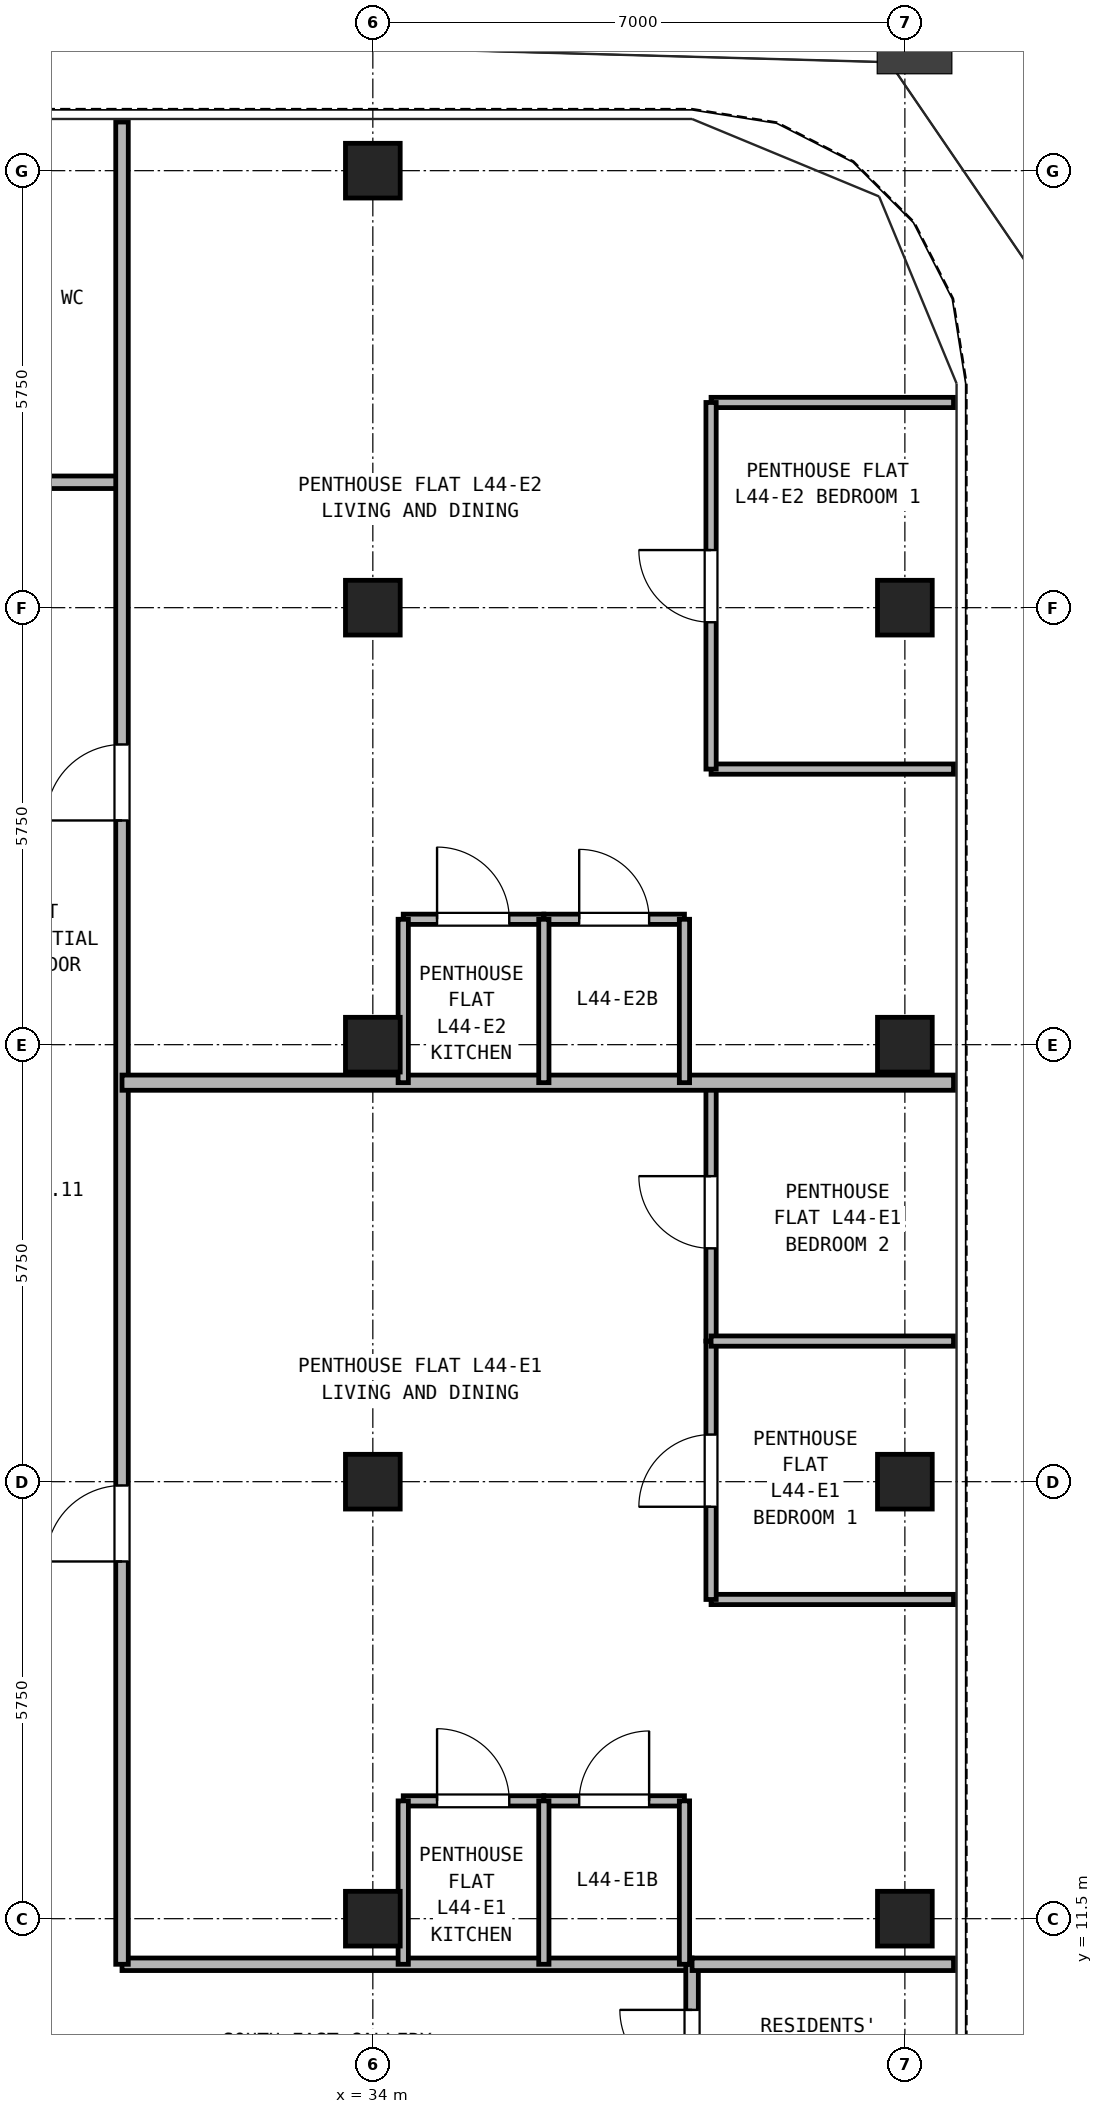
"""IFC4 building model, lengths in metres.
Left out: names, types, materials, properties, quantities, classifications, styles, units other than length and angle.
Written with IfcOpenShell. Run it as: python <this file> out.ifc"""

import sys

from ifc_helpers import new_model, si_unit, direction, frame, frame_2d, origin, origin_2d, place, context, subcontext, project, spatial, rectangle, hollow_rectangle, extrude, source, transform, mapped, element, fill, save


model = new_model("IFC4")
c1 = context("Model", 3, precision=1e-05, world=origin(), true_north=direction((0.0, 1.0)))
c2 = subcontext(c1, "Body", "Model", "MODEL_VIEW")
j1 = project(units=[si_unit("LENGTHUNIT", "METRE"), si_unit("PLANEANGLEUNIT", "RADIAN")], contexts=[c1])
p1 = place(None, origin())
s1 = spatial("IfcSite", under=j1, at=p1, CompositionType="ELEMENT")
p2 = place(p1, origin())
s2 = spatial("IfcBuilding", under=s1, at=p2, CompositionType="ELEMENT")
p3 = place(p2, frame((0.0, 0.0, 159.3)))
s3 = spatial("IfcBuildingStorey", under=s2, at=p3, CompositionType="ELEMENT", Elevation=159.3)
m1 = source(origin(), c2, "Body", "SweptSolid", [
    extrude(hollow_rectangle(XDim=0.72, YDim=0.72, WallThickness=0.04, at=origin_2d()), origin(), (0.0, 0.0, 1.0), 2.95),
])
for number, where, z_axis, x_axis in (
    (1, (34.0, 34.5, 0.0), (0.0, 0.0, 1.0), (1.0, 0.0, 0.0)),
    (2, (41.0, 11.5, 0.0), (0.0, 0.0, 1.0), (1.0, 0.0, 0.0)),
    (3, (41.0, 17.25, 0.0), (0.0, 0.0, 1.0), (1.0, 0.0, 0.0)),
    (4, (41.0, 23.0, 0.0), (0.0, 0.0, 1.0), (1.0, 0.0, 0.0)),
    (5, (41.0, 28.75, 0.0), (0.0, 0.0, 1.0), (1.0, 0.0, 0.0)),
    (6, (34.0, 11.5, 0.0), (0.0, 0.0, 1.0), (1.0, 0.0, 0.0)),
    (7, (34.0, 17.25, 0.0), (0.0, 0.0, 1.0), (1.0, 0.0, 0.0)),
    (8, (34.0, 23.0, 0.0), (0.0, 0.0, 1.0), (1.0, 0.0, 0.0)),
    (9, (34.0, 28.75, 0.0), (0.0, 0.0, 1.0), (1.0, 0.0, 0.0)),
):
    element("IfcColumn", number, at=place(p3, frame(where, z_axis=z_axis, x_axis=x_axis)), inside=s3, PredefinedType="COLUMN", context=c2, shape_type="MappedRepresentation", body=[
        mapped(m1, transform((0.0, 0.0, 0.0), x_axis=(1.0, 0.0, 0.0), y_axis=(0.0, 1.0, 0.0), z_axis=(0.0, 0.0, 1.0), scale=1.0)),
    ])
p4 = place(p3, frame((30.7, 10.9, 0.0), z_axis=(0.0, 0.0, 1.0), x_axis=(1.0, 0.0, 0.0)))
e10 = element("IfcWall", 10, at=p4, inside=s3, PredefinedType="PARTITIONING", context=c2, shape_type="SweptSolid", body=[
    extrude(rectangle(XDim=7.5, YDim=0.165, at=frame_2d((3.75, 0.0))), origin(), (0.0, 0.0, 1.0), 2.95),
])
p5 = place(p3, frame((38.2, 8.9, 0.0), z_axis=(0.0, 0.0, 1.0), x_axis=(0.0, 1.0, 0.0)))
e11 = element("IfcWall", 11, at=p5, inside=s3, PredefinedType="PARTITIONING", context=c2, shape_type="SweptSolid", body=[
    extrude(rectangle(XDim=2.0, YDim=0.165, at=frame_2d((1.0, 0.0))), origin(), (0.0, 0.0, 1.0), 2.95),
])
p6 = place(p5, frame((0.45, 0.0, 0.0)))
e12 = element("IfcOpeningElement", 12, at=p6, cuts=e11, PredefinedType="OPENING", context=c2, shape_type="SweptSolid", body=[
    extrude(rectangle(XDim=0.95, YDim=2.15, at=frame_2d((0.475, 1.075))), frame((0.0, 0.093, 0.0), z_axis=(0.0, -1.0, 0.0), x_axis=(1.0, 0.0, 0.0)), (0.0, 0.0, 1.0), 0.185),
])
p7 = place(p3, frame((16.3, 30.4, 0.0), z_axis=(0.0, 0.0, 1.0), x_axis=(1.0, 0.0, 0.0)))
e13 = element("IfcWall", 13, at=p7, inside=s3, PredefinedType="PARTITIONING", context=c2, shape_type="SweptSolid", body=[
    extrude(rectangle(XDim=14.4, YDim=0.165, at=frame_2d((7.2, 0.0))), origin(), (0.0, 0.0, 1.0), 2.95),
])
p8 = place(p7, frame((2.35, 0.0, 0.0)))
e14 = element("IfcOpeningElement", 14, at=p8, cuts=e13, PredefinedType="OPENING", context=c2, shape_type="SweptSolid", body=[
    extrude(rectangle(XDim=0.95, YDim=2.15, at=frame_2d((0.475, 1.075))), frame((0.0, 0.093, 0.0), z_axis=(0.0, -1.0, 0.0), x_axis=(1.0, 0.0, 0.0)), (0.0, 0.0, 1.0), 0.185),
])
p9 = place(p7, frame((7.25, 0.0, 0.0)))
e15 = element("IfcOpeningElement", 15, at=p9, cuts=e13, PredefinedType="OPENING", context=c2, shape_type="SweptSolid", body=[
    extrude(rectangle(XDim=0.95, YDim=2.15, at=frame_2d((0.475, 1.075))), frame((0.0, 0.093, 0.0), z_axis=(0.0, -1.0, 0.0), x_axis=(1.0, 0.0, 0.0)), (0.0, 0.0, 1.0), 0.185),
])
p10 = place(p7, frame((11.6, 0.0, 0.0)))
e16 = element("IfcOpeningElement", 16, at=p10, cuts=e13, PredefinedType="OPENING", context=c2, shape_type="SweptSolid", body=[
    extrude(rectangle(XDim=0.92, YDim=2.1, at=frame_2d((0.46, 1.05))), frame((0.0, 0.093, 0.0), z_axis=(0.0, -1.0, 0.0), x_axis=(1.0, 0.0, 0.0)), (0.0, 0.0, 1.0), 0.185),
])
p11 = place(p3, frame((30.7, 10.9, 0.0), z_axis=(0.0, 0.0, 1.0), x_axis=(0.0, 1.0, 0.0)))
e17 = element("IfcWall", 17, at=p11, inside=s3, PredefinedType="PARTITIONING", context=c2, shape_type="SweptSolid", body=[
    extrude(rectangle(XDim=24.24, YDim=0.165, at=frame_2d((12.12, 0.0))), origin(), (0.0, 0.0, 1.0), 2.95),
])
p12 = place(p11, frame((5.3, 0.0, 0.0)))
e18 = element("IfcOpeningElement", 18, at=p12, cuts=e17, PredefinedType="OPENING", context=c2, shape_type="SweptSolid", body=[
    extrude(rectangle(XDim=1.0, YDim=2.15, at=frame_2d((0.5, 1.075))), frame((0.0, 0.093, 0.0), z_axis=(0.0, -1.0, 0.0), x_axis=(1.0, 0.0, 0.0)), (0.0, 0.0, 1.0), 0.185),
])
p13 = place(p11, frame((15.05, 0.0, 0.0)))
e19 = element("IfcOpeningElement", 19, at=p13, cuts=e17, PredefinedType="OPENING", context=c2, shape_type="SweptSolid", body=[
    extrude(rectangle(XDim=1.0, YDim=2.15, at=frame_2d((0.5, 1.075))), frame((0.0, 0.093, 0.0), z_axis=(0.0, -1.0, 0.0), x_axis=(1.0, 0.0, 0.0)), (0.0, 0.0, 1.0), 0.185),
])
p14 = place(p3, frame((38.2, 10.9, 0.0), z_axis=(0.0, 0.0, 1.0), x_axis=(1.0, 0.0, 0.0)))
e20 = element("IfcWall", 20, at=p14, inside=s3, PredefinedType="PARTITIONING", context=c2, shape_type="SweptSolid", body=[
    extrude(rectangle(XDim=3.44, YDim=0.165, at=frame_2d((1.72, 0.0))), origin(), (0.0, 0.0, 1.0), 2.95),
])
p15 = place(p3, frame((34.4, 13.05, 0.0), z_axis=(0.0, 0.0, 1.0), x_axis=(1.0, 0.0, 0.0)))
e21 = element("IfcWall", 21, at=p15, inside=s3, PredefinedType="PARTITIONING", context=c2, shape_type="SweptSolid", body=[
    extrude(rectangle(XDim=1.85, YDim=0.135, at=frame_2d((0.925, 0.0))), origin(), (0.0, 0.0, 1.0), 2.95),
])
p16 = place(p15, frame((0.445, 0.0, 0.0)))
e22 = element("IfcOpeningElement", 22, at=p16, cuts=e21, PredefinedType="OPENING", context=c2, shape_type="SweptSolid", body=[
    extrude(rectangle(XDim=0.95, YDim=2.15, at=frame_2d((0.475, 1.075))), frame((0.0, 0.077, 0.0), z_axis=(0.0, -1.0, 0.0), x_axis=(1.0, 0.0, 0.0)), (0.0, 0.0, 1.0), 0.155),
])
p17 = place(p3, frame((36.25, 13.05, 0.0), z_axis=(0.0, 0.0, 1.0), x_axis=(1.0, 0.0, 0.0)))
e23 = element("IfcWall", 23, at=p17, inside=s3, PredefinedType="PARTITIONING", context=c2, shape_type="SweptSolid", body=[
    extrude(rectangle(XDim=1.85, YDim=0.135, at=frame_2d((0.925, 0.0))), origin(), (0.0, 0.0, 1.0), 2.95),
])
p18 = place(p17, frame((0.465, 0.0, 0.0)))
e24 = element("IfcOpeningElement", 24, at=p18, cuts=e23, PredefinedType="OPENING", context=c2, shape_type="SweptSolid", body=[
    extrude(rectangle(XDim=0.92, YDim=2.1, at=frame_2d((0.46, 1.05))), frame((0.0, 0.077, 0.0), z_axis=(0.0, -1.0, 0.0), x_axis=(1.0, 0.0, 0.0)), (0.0, 0.0, 1.0), 0.155),
])
for number, where, z_axis, x_axis in (
    (25, (34.4, 10.9, 0.0), (0.0, 0.0, 1.0), (0.0, 1.0, 0.0)),
    (26, (36.25, 10.9, 0.0), (0.0, 0.0, 1.0), (0.0, 1.0, 0.0)),
    (27, (38.1, 10.9, 0.0), (0.0, 0.0, 1.0), (0.0, 1.0, 0.0)),
):
    element("IfcWall", number, at=place(p3, frame(where, z_axis=z_axis, x_axis=x_axis)), inside=s3, PredefinedType="PARTITIONING", context=c2, shape_type="SweptSolid", body=[
        extrude(rectangle(XDim=2.15, YDim=0.135, at=frame_2d((1.075, 0.0))), origin(), (0.0, 0.0, 1.0), 2.95),
    ])
p19 = place(p3, frame((38.45, 15.7, 0.0), z_axis=(0.0, 0.0, 1.0), x_axis=(1.0, 0.0, 0.0)))
e28 = element("IfcWall", 28, at=p19, inside=s3, PredefinedType="PARTITIONING", context=c2, shape_type="SweptSolid", body=[
    extrude(rectangle(XDim=3.19, YDim=0.135, at=frame_2d((1.595, 0.0))), origin(), (0.0, 0.0, 1.0), 2.95),
])
p20 = place(p3, frame((38.45, 15.7, 0.0), z_axis=(0.0, 0.0, 1.0), x_axis=(0.0, 1.0, 0.0)))
e29 = element("IfcWall", 29, at=p20, inside=s3, PredefinedType="PARTITIONING", context=c2, shape_type="SweptSolid", body=[
    extrude(rectangle(XDim=3.4, YDim=0.135, at=frame_2d((1.7, 0.0))), origin(), (0.0, 0.0, 1.0), 2.95),
])
p21 = place(p20, frame((1.22, 0.0, 0.0)))
e30 = element("IfcOpeningElement", 30, at=p21, cuts=e29, PredefinedType="OPENING", context=c2, shape_type="SweptSolid", body=[
    extrude(rectangle(XDim=0.95, YDim=2.15, at=frame_2d((0.475, 1.075))), frame((0.0, 0.077, 0.0), z_axis=(0.0, -1.0, 0.0), x_axis=(1.0, 0.0, 0.0)), (0.0, 0.0, 1.0), 0.155),
])
p22 = place(p3, frame((38.45, 19.1, 0.0), z_axis=(0.0, 0.0, 1.0), x_axis=(0.0, 1.0, 0.0)))
e31 = element("IfcWall", 31, at=p22, inside=s3, PredefinedType="PARTITIONING", context=c2, shape_type="SweptSolid", body=[
    extrude(rectangle(XDim=3.4, YDim=0.135, at=frame_2d((1.7, 0.0))), origin(), (0.0, 0.0, 1.0), 2.95),
])
p23 = place(p22, frame((1.22, 0.0, 0.0)))
e32 = element("IfcOpeningElement", 32, at=p23, cuts=e31, PredefinedType="OPENING", context=c2, shape_type="SweptSolid", body=[
    extrude(rectangle(XDim=0.95, YDim=2.15, at=frame_2d((0.475, 1.075))), frame((0.0, 0.077, 0.0), z_axis=(0.0, -1.0, 0.0), x_axis=(1.0, 0.0, 0.0)), (0.0, 0.0, 1.0), 0.155),
])
p24 = place(p3, frame((38.45, 19.1, 0.0), z_axis=(0.0, 0.0, 1.0), x_axis=(1.0, 0.0, 0.0)))
e33 = element("IfcWall", 33, at=p24, inside=s3, PredefinedType="PARTITIONING", context=c2, shape_type="SweptSolid", body=[
    extrude(rectangle(XDim=3.19, YDim=0.135, at=frame_2d((1.595, 0.0))), origin(), (0.0, 0.0, 1.0), 2.95),
])
p25 = place(p3, frame((30.7, 22.5, 0.0), z_axis=(0.0, 0.0, 1.0), x_axis=(1.0, 0.0, 0.0)))
e34 = element("IfcWall", 34, at=p25, inside=s3, PredefinedType="PARTITIONING", context=c2, shape_type="SweptSolid", body=[
    extrude(rectangle(XDim=10.94, YDim=0.2, at=frame_2d((5.47, 0.0))), origin(), (0.0, 0.0, 1.0), 2.95),
])
p26 = place(p3, frame((34.4, 24.65, 0.0), z_axis=(0.0, 0.0, 1.0), x_axis=(1.0, 0.0, 0.0)))
e35 = element("IfcWall", 35, at=p26, inside=s3, PredefinedType="PARTITIONING", context=c2, shape_type="SweptSolid", body=[
    extrude(rectangle(XDim=1.85, YDim=0.135, at=frame_2d((0.925, 0.0))), origin(), (0.0, 0.0, 1.0), 2.95),
])
p27 = place(p26, frame((0.445, 0.0, 0.0)))
e36 = element("IfcOpeningElement", 36, at=p27, cuts=e35, PredefinedType="OPENING", context=c2, shape_type="SweptSolid", body=[
    extrude(rectangle(XDim=0.95, YDim=2.15, at=frame_2d((0.475, 1.075))), frame((0.0, 0.077, 0.0), z_axis=(0.0, -1.0, 0.0), x_axis=(1.0, 0.0, 0.0)), (0.0, 0.0, 1.0), 0.155),
])
p28 = place(p3, frame((36.25, 24.65, 0.0), z_axis=(0.0, 0.0, 1.0), x_axis=(1.0, 0.0, 0.0)))
e37 = element("IfcWall", 37, at=p28, inside=s3, PredefinedType="PARTITIONING", context=c2, shape_type="SweptSolid", body=[
    extrude(rectangle(XDim=1.85, YDim=0.135, at=frame_2d((0.925, 0.0))), origin(), (0.0, 0.0, 1.0), 2.95),
])
p29 = place(p28, frame((0.465, 0.0, 0.0)))
e38 = element("IfcOpeningElement", 38, at=p29, cuts=e37, PredefinedType="OPENING", context=c2, shape_type="SweptSolid", body=[
    extrude(rectangle(XDim=0.92, YDim=2.1, at=frame_2d((0.46, 1.05))), frame((0.0, 0.077, 0.0), z_axis=(0.0, -1.0, 0.0), x_axis=(1.0, 0.0, 0.0)), (0.0, 0.0, 1.0), 0.155),
])
for number, where, z_axis, x_axis in (
    (39, (34.4, 22.5, 0.0), (0.0, 0.0, 1.0), (0.0, 1.0, 0.0)),
    (40, (36.25, 22.5, 0.0), (0.0, 0.0, 1.0), (0.0, 1.0, 0.0)),
    (41, (38.1, 22.5, 0.0), (0.0, 0.0, 1.0), (0.0, 1.0, 0.0)),
):
    element("IfcWall", number, at=place(p3, frame(where, z_axis=z_axis, x_axis=x_axis)), inside=s3, PredefinedType="PARTITIONING", context=c2, shape_type="SweptSolid", body=[
        extrude(rectangle(XDim=2.15, YDim=0.135, at=frame_2d((1.075, 0.0))), origin(), (0.0, 0.0, 1.0), 2.95),
    ])
for number, where, z_axis, x_axis in (
    (42, (38.45, 26.626, 0.0), (0.0, 0.0, 1.0), (1.0, 0.0, 0.0)),
    (43, (38.45, 31.45, 0.0), (0.0, 0.0, 1.0), (1.0, 0.0, 0.0)),
):
    element("IfcWall", number, at=place(p3, frame(where, z_axis=z_axis, x_axis=x_axis)), inside=s3, PredefinedType="PARTITIONING", context=c2, shape_type="SweptSolid", body=[
        extrude(rectangle(XDim=3.19, YDim=0.135, at=frame_2d((1.595, 0.0))), origin(), (0.0, 0.0, 1.0), 2.95),
    ])
p30 = place(p3, frame((38.45, 26.626, 0.0), z_axis=(0.0, 0.0, 1.0), x_axis=(0.0, 1.0, 0.0)))
e44 = element("IfcWall", 44, at=p30, inside=s3, PredefinedType="PARTITIONING", context=c2, shape_type="SweptSolid", body=[
    extrude(rectangle(XDim=4.824, YDim=0.135, at=frame_2d((2.412, 0.0))), origin(), (0.0, 0.0, 1.0), 2.95),
])
p31 = place(p30, frame((1.932, 0.0, 0.0)))
e45 = element("IfcOpeningElement", 45, at=p31, cuts=e44, PredefinedType="OPENING", context=c2, shape_type="SweptSolid", body=[
    extrude(rectangle(XDim=0.95, YDim=2.15, at=frame_2d((0.475, 1.075))), frame((0.0, 0.077, 0.0), z_axis=(0.0, -1.0, 0.0), x_axis=(1.0, 0.0, 0.0)), (0.0, 0.0, 1.0), 0.155),
])
p32 = place(p6, origin())
e46 = element("IfcDoor", 46, at=p32, inside=s3, OperationType="SINGLE_SWING_RIGHT", PredefinedType="DOOR", context=c2, shape_type="SweptSolid", body=[
    extrude(rectangle(XDim=0.95, YDim=2.15, at=frame_2d((0.475, 1.075))), frame((0.0, 0.025, 0.0), z_axis=(0.0, -1.0, 0.0), x_axis=(1.0, 0.0, 0.0)), (0.0, 0.0, 1.0), 0.05),
])
fill(e12, e46)
p33 = place(p16, origin())
e47 = element("IfcDoor", 47, at=p33, inside=s3, OperationType="SINGLE_SWING_LEFT", PredefinedType="DOOR", context=c2, shape_type="SweptSolid", body=[
    extrude(rectangle(XDim=0.95, YDim=2.15, at=frame_2d((0.475, 1.075))), frame((0.0, 0.025, 0.0), z_axis=(0.0, -1.0, 0.0), x_axis=(1.0, 0.0, 0.0)), (0.0, 0.0, 1.0), 0.05),
])
fill(e22, e47)
p34 = place(p18, origin())
e48 = element("IfcDoor", 48, at=p34, inside=s3, OperationType="SINGLE_SWING_RIGHT", PredefinedType="DOOR", context=c2, shape_type="SweptSolid", body=[
    extrude(rectangle(XDim=0.92, YDim=2.1, at=frame_2d((0.46, 1.05))), frame((0.0, 0.025, 0.0), z_axis=(0.0, -1.0, 0.0), x_axis=(1.0, 0.0, 0.0)), (0.0, 0.0, 1.0), 0.05),
])
fill(e24, e48)
p35 = place(p21, frame((0.95, 0.0, 0.0), z_axis=(0.0, 0.0, 1.0), x_axis=(-1.0, 0.0, 0.0)))
e49 = element("IfcDoor", 49, at=p35, inside=s3, OperationType="SINGLE_SWING_LEFT", PredefinedType="DOOR", context=c2, shape_type="SweptSolid", body=[
    extrude(rectangle(XDim=0.95, YDim=2.15, at=frame_2d((0.475, 1.075))), frame((0.0, 0.025, 0.0), z_axis=(0.0, -1.0, 0.0), x_axis=(1.0, 0.0, 0.0)), (0.0, 0.0, 1.0), 0.05),
])
fill(e30, e49)
p36 = place(p23, frame((0.95, 0.0, 0.0), z_axis=(0.0, 0.0, 1.0), x_axis=(-1.0, 0.0, 0.0)))
e50 = element("IfcDoor", 50, at=p36, inside=s3, OperationType="SINGLE_SWING_RIGHT", PredefinedType="DOOR", context=c2, shape_type="SweptSolid", body=[
    extrude(rectangle(XDim=0.95, YDim=2.15, at=frame_2d((0.475, 1.075))), frame((0.0, 0.025, 0.0), z_axis=(0.0, -1.0, 0.0), x_axis=(1.0, 0.0, 0.0)), (0.0, 0.0, 1.0), 0.05),
])
fill(e32, e50)
p37 = place(p12, frame((1.0, 0.0, 0.0), z_axis=(0.0, 0.0, 1.0), x_axis=(-1.0, 0.0, 0.0)))
e51 = element("IfcDoor", 51, at=p37, inside=s3, OperationType="SINGLE_SWING_LEFT", PredefinedType="DOOR", context=c2, shape_type="SweptSolid", body=[
    extrude(rectangle(XDim=1.0, YDim=2.15, at=frame_2d((0.5, 1.075))), frame((0.0, 0.025, 0.0), z_axis=(0.0, -1.0, 0.0), x_axis=(1.0, 0.0, 0.0)), (0.0, 0.0, 1.0), 0.05),
])
fill(e18, e51)
p38 = place(p27, origin())
e52 = element("IfcDoor", 52, at=p38, inside=s3, OperationType="SINGLE_SWING_LEFT", PredefinedType="DOOR", context=c2, shape_type="SweptSolid", body=[
    extrude(rectangle(XDim=0.95, YDim=2.15, at=frame_2d((0.475, 1.075))), frame((0.0, 0.025, 0.0), z_axis=(0.0, -1.0, 0.0), x_axis=(1.0, 0.0, 0.0)), (0.0, 0.0, 1.0), 0.05),
])
fill(e36, e52)
p39 = place(p29, origin())
e53 = element("IfcDoor", 53, at=p39, inside=s3, OperationType="SINGLE_SWING_LEFT", PredefinedType="DOOR", context=c2, shape_type="SweptSolid", body=[
    extrude(rectangle(XDim=0.92, YDim=2.1, at=frame_2d((0.46, 1.05))), frame((0.0, 0.025, 0.0), z_axis=(0.0, -1.0, 0.0), x_axis=(1.0, 0.0, 0.0)), (0.0, 0.0, 1.0), 0.05),
])
fill(e38, e53)
p40 = place(p31, frame((0.95, 0.0, 0.0), z_axis=(0.0, 0.0, 1.0), x_axis=(-1.0, 0.0, 0.0)))
e54 = element("IfcDoor", 54, at=p40, inside=s3, OperationType="SINGLE_SWING_RIGHT", PredefinedType="DOOR", context=c2, shape_type="SweptSolid", body=[
    extrude(rectangle(XDim=0.95, YDim=2.15, at=frame_2d((0.475, 1.075))), frame((0.0, 0.025, 0.0), z_axis=(0.0, -1.0, 0.0), x_axis=(1.0, 0.0, 0.0)), (0.0, 0.0, 1.0), 0.05),
])
fill(e45, e54)
p41 = place(p13, frame((1.0, 0.0, 0.0), z_axis=(0.0, 0.0, 1.0), x_axis=(-1.0, 0.0, 0.0)))
e55 = element("IfcDoor", 55, at=p41, inside=s3, OperationType="SINGLE_SWING_LEFT", PredefinedType="DOOR", context=c2, shape_type="SweptSolid", body=[
    extrude(rectangle(XDim=1.0, YDim=2.15, at=frame_2d((0.5, 1.075))), frame((0.0, 0.025, 0.0), z_axis=(0.0, -1.0, 0.0), x_axis=(1.0, 0.0, 0.0)), (0.0, 0.0, 1.0), 0.05),
])
fill(e19, e55)
save(model, sys.argv[1])
